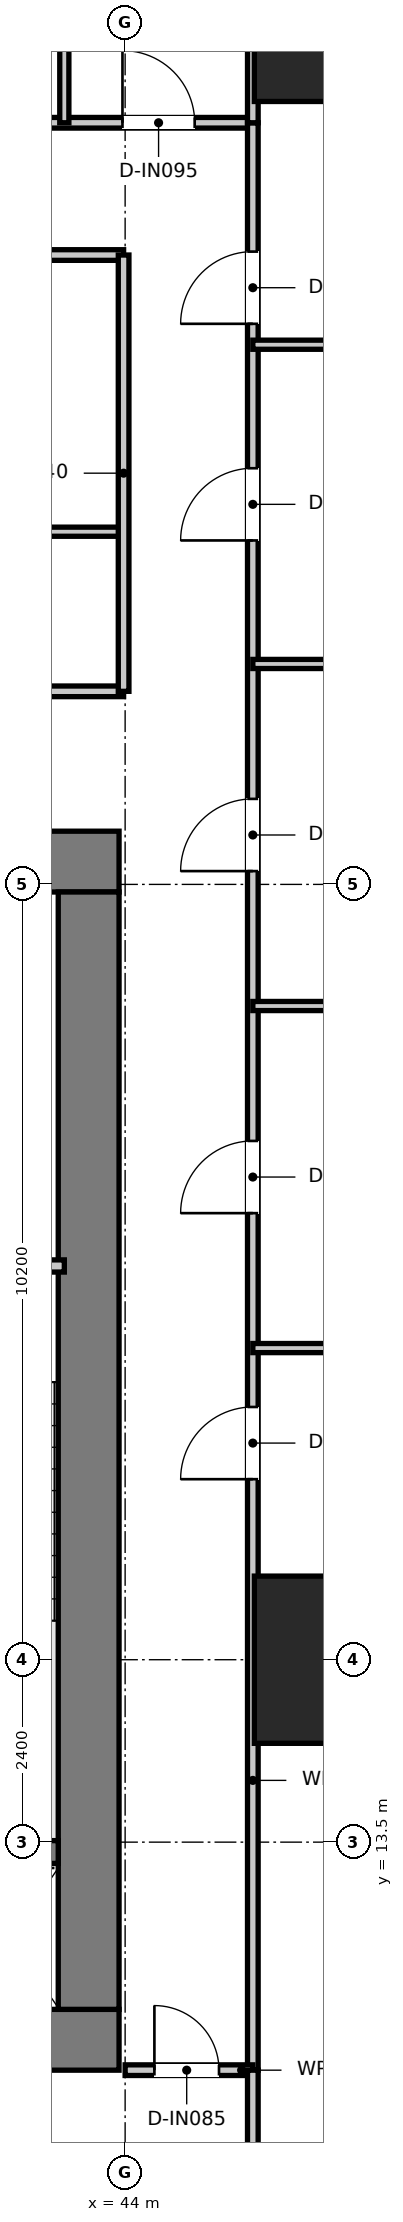
"""IFC4 building model, lengths in metres.
Left out: names, types, materials, properties, quantities, classifications, styles, units other than length and angle.
Written with IfcOpenShell. Run it as: python <this file> out.ifc"""

import sys

from ifc_helpers import new_model, si_unit, direction, frame, frame_2d, origin, origin_2d, place, context, subcontext, project, spatial, rectangle, extrude, source, transform, mapped, element, fill, save


model = new_model("IFC4")
c1 = context("Model", 3, precision=1e-05, world=origin(), true_north=direction((0.0, 1.0)))
c2 = subcontext(c1, "Body", "Model", "MODEL_VIEW")
j1 = project(units=[si_unit("LENGTHUNIT", "METRE"), si_unit("PLANEANGLEUNIT", "RADIAN")], contexts=[c1])
p1 = place(None, origin())
s1 = spatial("IfcSite", under=j1, at=p1, CompositionType="ELEMENT")
p2 = place(p1, origin())
s2 = spatial("IfcBuilding", under=s1, at=p2, CompositionType="ELEMENT")
p3 = place(p2, frame((0.0, 0.0, 68.45)))
s3 = spatial("IfcBuildingStorey", under=s2, at=p3, CompositionType="ELEMENT", Elevation=68.45)
p4 = place(p3, frame((28.08, 10.9, 0.0), z_axis=(0.0, 0.0, 1.0), x_axis=(1.0, 0.0, 0.0)))
e1 = element("IfcWall", 1, at=p4, inside=s3, PredefinedType="SHEAR", context=c2, shape_type="SweptSolid", body=[
    extrude(rectangle(XDim=15.84, YDim=0.8, at=frame_2d((7.92, 0.0))), origin(), (0.0, 0.0, 1.0), 3.95),
])
p5 = place(p3, frame((28.08, 26.4, 0.0), z_axis=(0.0, 0.0, 1.0), x_axis=(1.0, 0.0, 0.0)))
e2 = element("IfcWall", 2, at=p5, inside=s3, PredefinedType="SHEAR", context=c2, shape_type="SweptSolid", body=[
    extrude(rectangle(XDim=15.84, YDim=0.8, at=frame_2d((7.92, 0.0))), origin(), (0.0, 0.0, 1.0), 3.95),
])
p6 = place(p5, frame((7.22, 0.0, 0.0)))
e3 = element("IfcOpeningElement", 3, at=p6, cuts=e2, PredefinedType="OPENING", context=c2, shape_type="SweptSolid", body=[
    extrude(rectangle(XDim=1.4, YDim=2.2, at=frame_2d((0.7, 1.1))), frame((0.0, 0.41, 0.0), z_axis=(0.0, -1.0, 0.0), x_axis=(1.0, 0.0, 0.0)), (0.0, 0.0, 1.0), 0.82),
])
p7 = place(p5, frame((1.775, 0.0, 0.0)))
e4 = element("IfcOpeningElement", 4, at=p7, cuts=e2, PredefinedType="OPENING", context=c2, shape_type="SweptSolid", body=[
    extrude(rectangle(XDim=1.05, YDim=2.1, at=frame_2d((0.525, 1.05))), frame((0.0, 0.41, 0.0), z_axis=(0.0, -1.0, 0.0), x_axis=(1.0, 0.0, 0.0)), (0.0, 0.0, 1.0), 0.82),
])
p8 = place(p5, frame((13.015, 0.0, 0.0)))
e5 = element("IfcOpeningElement", 5, at=p8, cuts=e2, PredefinedType="OPENING", context=c2, shape_type="SweptSolid", body=[
    extrude(rectangle(XDim=1.05, YDim=2.1, at=frame_2d((0.525, 1.05))), frame((0.0, 0.41, 0.0), z_axis=(0.0, -1.0, 0.0), x_axis=(1.0, 0.0, 0.0)), (0.0, 0.0, 1.0), 0.82),
])
p9 = place(p3, frame((43.52, 11.3, 0.0), z_axis=(0.0, 0.0, 1.0), x_axis=(0.0, 1.0, 0.0)))
e6 = element("IfcWall", 6, at=p9, inside=s3, PredefinedType="SHEAR", context=c2, shape_type="SweptSolid", body=[
    extrude(rectangle(XDim=14.7, YDim=0.8, at=frame_2d((7.35, 0.0))), origin(), (0.0, 0.0, 1.0), 3.95),
])
p10 = place(p3, frame((40.02, 13.37, 0.0), z_axis=(0.0, 0.0, 1.0), x_axis=(1.0, 0.0, 0.0)))
e7 = element("IfcWall", 7, at=p10, inside=s3, PredefinedType="SHEAR", context=c2, shape_type="SweptSolid", body=[
    extrude(rectangle(XDim=3.1, YDim=0.3, at=frame_2d((1.55, 0.0))), origin(), (0.0, 0.0, 1.0), 3.95),
])
m1 = source(origin(), c2, "Body", "SweptSolid", [
    extrude(rectangle(XDim=2.2, YDim=2.2, at=origin_2d()), origin(), (0.0, 0.0, 1.0), 3.95),
])
for number, where, z_axis, x_axis in (
    (8, (46.8, 15.9, 0.0), (0.0, 0.0, 1.0), (1.0, 0.0, 0.0)),
    (9, (46.8, 37.5, 0.0), (0.0, 0.0, 1.0), (1.0, 0.0, 0.0)),
):
    element("IfcColumn", number, at=place(p3, frame(where, z_axis=z_axis, x_axis=x_axis)), inside=s3, PredefinedType="USERDEFINED", context=c2, shape_type="MappedRepresentation", body=[
        mapped(m1, transform((0.0, 0.0, 0.0), x_axis=(1.0, 0.0, 0.0), y_axis=(0.0, 1.0, 0.0), z_axis=(0.0, 0.0, 1.0), scale=1.0)),
    ])
p11 = place(p3, frame((40.04, 21.08, 0.0), z_axis=(0.0, 0.0, 1.0), x_axis=(1.0, 0.0, 0.0)))
e10 = element("IfcWall", 10, at=p11, inside=s3, PredefinedType="PARTITIONING", context=c2, shape_type="SweptSolid", body=[
    extrude(rectangle(XDim=3.16, YDim=0.16, at=frame_2d((1.58, 0.0))), origin(), (0.0, 0.0, 1.0), 3.67),
])
p12 = place(p11, frame((1.055, 0.0, 0.0)))
e11 = element("IfcOpeningElement", 11, at=p12, cuts=e10, PredefinedType="OPENING", context=c2, shape_type="SweptSolid", body=[
    extrude(rectangle(XDim=1.05, YDim=2.1, at=frame_2d((0.525, 1.05))), frame((0.0, 0.09, 0.0), z_axis=(0.0, -1.0, 0.0), x_axis=(1.0, 0.0, 0.0)), (0.0, 0.0, 1.0), 0.18),
])
p13 = place(p3, frame((28.02, 28.64, 0.0), z_axis=(0.0, 0.0, 1.0), x_axis=(1.0, 0.0, 0.0)))
e12 = element("IfcWall", 12, at=p13, inside=s3, PredefinedType="PARTITIONING", context=c2, shape_type="SweptSolid", body=[
    extrude(rectangle(XDim=15.96, YDim=0.14, at=frame_2d((7.98, 0.0))), origin(), (0.0, 0.0, 1.0), 3.08),
])
p14 = place(p13, frame((7.455, 0.0, 0.0)))
e13 = element("IfcOpeningElement", 13, at=p14, cuts=e12, PredefinedType="OPENING", context=c2, shape_type="SweptSolid", body=[
    extrude(rectangle(XDim=1.05, YDim=2.15, at=frame_2d((0.525, 1.075))), frame((0.0, 0.08, 0.0), z_axis=(0.0, -1.0, 0.0), x_axis=(1.0, 0.0, 0.0)), (0.0, 0.0, 1.0), 0.16),
])
p15 = place(p3, frame((28.02, 30.74, 0.0), z_axis=(0.0, 0.0, 1.0), x_axis=(1.0, 0.0, 0.0)))
e14 = element("IfcWall", 14, at=p15, inside=s3, PredefinedType="PARTITIONING", context=c2, shape_type="SweptSolid", body=[
    extrude(rectangle(XDim=15.96, YDim=0.12, at=frame_2d((7.98, 0.0))), origin(), (0.0, 0.0, 1.0), 3.08),
])
p16 = place(p3, frame((28.02, 34.38, 0.0), z_axis=(0.0, 0.0, 1.0), x_axis=(1.0, 0.0, 0.0)))
e15 = element("IfcWall", 15, at=p16, inside=s3, PredefinedType="PARTITIONING", context=c2, shape_type="SweptSolid", body=[
    extrude(rectangle(XDim=15.96, YDim=0.14, at=frame_2d((7.98, 0.0))), origin(), (0.0, 0.0, 1.0), 3.08),
])
p17 = place(p16, frame((1.13, 0.0, 0.0)))
e16 = element("IfcOpeningElement", 16, at=p17, cuts=e15, PredefinedType="OPENING", context=c2, shape_type="SweptSolid", body=[
    extrude(rectangle(XDim=0.9, YDim=2.1, at=frame_2d((0.45, 1.05))), frame((0.0, 0.08, 0.0), z_axis=(0.0, -1.0, 0.0), x_axis=(1.0, 0.0, 0.0)), (0.0, 0.0, 1.0), 0.16),
])
p18 = place(p16, frame((4.33, 0.0, 0.0)))
e17 = element("IfcOpeningElement", 17, at=p18, cuts=e15, PredefinedType="OPENING", context=c2, shape_type="SweptSolid", body=[
    extrude(rectangle(XDim=0.9, YDim=2.1, at=frame_2d((0.45, 1.05))), frame((0.0, 0.08, 0.0), z_axis=(0.0, -1.0, 0.0), x_axis=(1.0, 0.0, 0.0)), (0.0, 0.0, 1.0), 0.16),
])
p19 = place(p16, frame((7.355, 0.0, 0.0)))
e18 = element("IfcOpeningElement", 18, at=p19, cuts=e15, PredefinedType="OPENING", context=c2, shape_type="SweptSolid", body=[
    extrude(rectangle(XDim=0.95, YDim=2.1, at=frame_2d((0.475, 1.05))), frame((0.0, 0.08, 0.0), z_axis=(0.0, -1.0, 0.0), x_axis=(1.0, 0.0, 0.0)), (0.0, 0.0, 1.0), 0.16),
])
p20 = place(p16, frame((12.23, 0.0, 0.0)))
e19 = element("IfcOpeningElement", 19, at=p20, cuts=e15, PredefinedType="OPENING", context=c2, shape_type="SweptSolid", body=[
    extrude(rectangle(XDim=0.95, YDim=2.1, at=frame_2d((0.475, 1.05))), frame((0.0, 0.08, 0.0), z_axis=(0.0, -1.0, 0.0), x_axis=(1.0, 0.0, 0.0)), (0.0, 0.0, 1.0), 0.16),
])
p21 = place(p3, frame((43.98, 28.64, 0.0), z_axis=(0.0, 0.0, 1.0), x_axis=(0.0, 1.0, 0.0)))
e20 = element("IfcWall", 20, at=p21, inside=s3, PredefinedType="PARTITIONING", context=c2, shape_type="SweptSolid", body=[
    extrude(rectangle(XDim=5.74, YDim=0.14, at=frame_2d((2.87, 0.0))), origin(), (0.0, 0.0, 1.0), 3.22),
])
p22 = place(p3, frame((26.32, 36.12, 0.0), z_axis=(0.0, 0.0, 1.0), x_axis=(1.0, 0.0, 0.0)))
e21 = element("IfcWall", 21, at=p22, inside=s3, PredefinedType="PARTITIONING", context=c2, shape_type="SweptSolid", body=[
    extrude(rectangle(XDim=19.36, YDim=0.14, at=frame_2d((9.68, 0.0))), origin(), (0.0, 0.0, 1.0), 3.08),
])
p23 = place(p22, frame((1.265, 0.0, 0.0)))
e22 = element("IfcOpeningElement", 22, at=p23, cuts=e21, PredefinedType="OPENING", context=c2, shape_type="SweptSolid", body=[
    extrude(rectangle(XDim=0.95, YDim=2.1, at=frame_2d((0.475, 1.05))), frame((0.0, 0.08, 0.0), z_axis=(0.0, -1.0, 0.0), x_axis=(1.0, 0.0, 0.0)), (0.0, 0.0, 1.0), 0.16),
])
p24 = place(p22, frame((5.305, 0.0, 0.0)))
e23 = element("IfcOpeningElement", 23, at=p24, cuts=e21, PredefinedType="OPENING", context=c2, shape_type="SweptSolid", body=[
    extrude(rectangle(XDim=0.95, YDim=2.1, at=frame_2d((0.475, 1.05))), frame((0.0, 0.08, 0.0), z_axis=(0.0, -1.0, 0.0), x_axis=(1.0, 0.0, 0.0)), (0.0, 0.0, 1.0), 0.16),
])
p25 = place(p22, frame((9.905, 0.0, 0.0)))
e24 = element("IfcOpeningElement", 24, at=p25, cuts=e21, PredefinedType="OPENING", context=c2, shape_type="SweptSolid", body=[
    extrude(rectangle(XDim=0.95, YDim=2.1, at=frame_2d((0.475, 1.05))), frame((0.0, 0.08, 0.0), z_axis=(0.0, -1.0, 0.0), x_axis=(1.0, 0.0, 0.0)), (0.0, 0.0, 1.0), 0.16),
])
p26 = place(p22, frame((14.305, 0.0, 0.0)))
e25 = element("IfcOpeningElement", 25, at=p26, cuts=e21, PredefinedType="OPENING", context=c2, shape_type="SweptSolid", body=[
    extrude(rectangle(XDim=0.95, YDim=2.1, at=frame_2d((0.475, 1.05))), frame((0.0, 0.08, 0.0), z_axis=(0.0, -1.0, 0.0), x_axis=(1.0, 0.0, 0.0)), (0.0, 0.0, 1.0), 0.16),
])
p27 = place(p22, frame((17.645, 0.0, 0.0)))
e26 = element("IfcOpeningElement", 26, at=p27, cuts=e21, PredefinedType="OPENING", context=c2, shape_type="SweptSolid", body=[
    extrude(rectangle(XDim=0.95, YDim=2.1, at=frame_2d((0.475, 1.05))), frame((0.0, 0.08, 0.0), z_axis=(0.0, -1.0, 0.0), x_axis=(1.0, 0.0, 0.0)), (0.0, 0.0, 1.0), 0.16),
])
p28 = place(p3, frame((45.68, 10.5, 0.0), z_axis=(0.0, 0.0, 1.0), x_axis=(0.0, 1.0, 0.0)))
e27 = element("IfcWall", 27, at=p28, inside=s3, PredefinedType="PARTITIONING", context=c2, shape_type="SweptSolid", body=[
    extrude(rectangle(XDim=25.62, YDim=0.14, at=frame_2d((12.81, 0.0))), origin(), (0.0, 0.0, 1.0), 2.97),
])
p29 = place(p28, frame((7.775, 0.0, 0.0)))
e28 = element("IfcOpeningElement", 28, at=p29, cuts=e27, PredefinedType="OPENING", context=c2, shape_type="SweptSolid", body=[
    extrude(rectangle(XDim=0.95, YDim=2.1, at=frame_2d((0.475, 1.05))), frame((0.0, 0.08, 0.0), z_axis=(0.0, -1.0, 0.0), x_axis=(1.0, 0.0, 0.0)), (0.0, 0.0, 1.0), 0.16),
])
p30 = place(p28, frame((11.275, 0.0, 0.0)))
e29 = element("IfcOpeningElement", 29, at=p30, cuts=e27, PredefinedType="OPENING", context=c2, shape_type="SweptSolid", body=[
    extrude(rectangle(XDim=0.95, YDim=2.1, at=frame_2d((0.475, 1.05))), frame((0.0, 0.08, 0.0), z_axis=(0.0, -1.0, 0.0), x_axis=(1.0, 0.0, 0.0)), (0.0, 0.0, 1.0), 0.16),
])
p31 = place(p28, frame((15.775, 0.0, 0.0)))
e30 = element("IfcOpeningElement", 30, at=p31, cuts=e27, PredefinedType="OPENING", context=c2, shape_type="SweptSolid", body=[
    extrude(rectangle(XDim=0.95, YDim=2.1, at=frame_2d((0.475, 1.05))), frame((0.0, 0.08, 0.0), z_axis=(0.0, -1.0, 0.0), x_axis=(1.0, 0.0, 0.0)), (0.0, 0.0, 1.0), 0.16),
])
p32 = place(p28, frame((20.125, 0.0, 0.0)))
e31 = element("IfcOpeningElement", 31, at=p32, cuts=e27, PredefinedType="OPENING", context=c2, shape_type="SweptSolid", body=[
    extrude(rectangle(XDim=0.95, YDim=2.1, at=frame_2d((0.475, 1.05))), frame((0.0, 0.08, 0.0), z_axis=(0.0, -1.0, 0.0), x_axis=(1.0, 0.0, 0.0)), (0.0, 0.0, 1.0), 0.16),
])
p33 = place(p28, frame((22.975, 0.0, 0.0)))
e32 = element("IfcOpeningElement", 32, at=p33, cuts=e27, PredefinedType="OPENING", context=c2, shape_type="SweptSolid", body=[
    extrude(rectangle(XDim=0.95, YDim=2.1, at=frame_2d((0.475, 1.05))), frame((0.0, 0.08, 0.0), z_axis=(0.0, -1.0, 0.0), x_axis=(1.0, 0.0, 0.0)), (0.0, 0.0, 1.0), 0.16),
])
p34 = place(p3, frame((44.0, 10.5, 0.0), z_axis=(0.0, 0.0, 1.0), x_axis=(1.0, 0.0, 0.0)))
e33 = element("IfcWall", 33, at=p34, inside=s3, PredefinedType="PARTITIONING", context=c2, shape_type="SweptSolid", body=[
    extrude(rectangle(XDim=1.68, YDim=0.14, at=frame_2d((0.84, 0.0))), origin(), (0.0, 0.0, 1.0), 3.67),
])
p35 = place(p34, frame((0.385, 0.0, 0.0)))
e34 = element("IfcOpeningElement", 34, at=p35, cuts=e33, PredefinedType="OPENING", context=c2, shape_type="SweptSolid", body=[
    extrude(rectangle(XDim=0.85, YDim=2.1, at=frame_2d((0.425, 1.05))), frame((0.0, 0.08, 0.0), z_axis=(0.0, -1.0, 0.0), x_axis=(1.0, 0.0, 0.0)), (0.0, 0.0, 1.0), 0.16),
])
p36 = place(p3, frame((45.68, 36.12, 0.0), z_axis=(0.0, 0.0, 1.0), x_axis=(0.0, 1.0, 0.0)))
e35 = element("IfcWall", 35, at=p36, inside=s3, PredefinedType="PARTITIONING", context=c2, shape_type="SweptSolid", body=[
    extrude(rectangle(XDim=14.32, YDim=0.14, at=frame_2d((7.16, 0.0))), origin(), (0.0, 0.0, 1.0), 2.97),
])
p37 = place(p3, frame((45.68, 0.067, 0.0), z_axis=(0.0, 0.0, 1.0), x_axis=(0.0, 1.0, 0.0)))
e36 = element("IfcWall", 36, at=p37, inside=s3, PredefinedType="PARTITIONING", context=c2, shape_type="SweptSolid", body=[
    extrude(rectangle(XDim=10.433, YDim=0.14, at=frame_2d((5.217, 0.0))), origin(), (0.0, 0.0, 1.0), 3.67),
])
p38 = place(p3, frame((43.2, 36.12, 0.0), z_axis=(0.0, 0.0, 1.0), x_axis=(0.0, 1.0, 0.0)))
e37 = element("IfcWall", 37, at=p38, inside=s3, PredefinedType="PARTITIONING", context=c2, shape_type="SweptSolid", body=[
    extrude(rectangle(XDim=14.69, YDim=0.12, at=frame_2d((7.345, 0.0))), origin(), (0.0, 0.0, 1.0), 2.97),
])
p39 = place(p3, frame((45.68, 20.0, 0.0), z_axis=(0.0, 0.0, 1.0), x_axis=(1.0, 0.0, 0.0)))
e38 = element("IfcWall", 38, at=p39, inside=s3, PredefinedType="PARTITIONING", context=c2, shape_type="SweptSolid", body=[
    extrude(rectangle(XDim=14.505, YDim=0.12, at=frame_2d((7.253, 0.0))), origin(), (0.0, 0.0, 1.0), 2.97),
])
p40 = place(p3, frame((45.68, 24.5, 0.0), z_axis=(0.0, 0.0, 1.0), x_axis=(1.0, 0.0, 0.0)))
e39 = element("IfcWall", 39, at=p40, inside=s3, PredefinedType="PARTITIONING", context=c2, shape_type="SweptSolid", body=[
    extrude(rectangle(XDim=15.178, YDim=0.12, at=frame_2d((7.589, 0.0))), origin(), (0.0, 0.0, 1.0), 2.97),
])
p41 = place(p3, frame((45.68, 29.0, 0.0), z_axis=(0.0, 0.0, 1.0), x_axis=(1.0, 0.0, 0.0)))
e40 = element("IfcWall", 40, at=p41, inside=s3, PredefinedType="PARTITIONING", context=c2, shape_type="SweptSolid", body=[
    extrude(rectangle(XDim=15.851, YDim=0.12, at=frame_2d((7.925, 0.0))), origin(), (0.0, 0.0, 1.0), 2.97),
])
p42 = place(p3, frame((45.68, 33.2, 0.0), z_axis=(0.0, 0.0, 1.0), x_axis=(1.0, 0.0, 0.0)))
e41 = element("IfcWall", 41, at=p42, inside=s3, PredefinedType="PARTITIONING", context=c2, shape_type="SweptSolid", body=[
    extrude(rectangle(XDim=16.478, YDim=0.12, at=frame_2d((8.239, 0.0))), origin(), (0.0, 0.0, 1.0), 2.97),
])
p43 = place(p27, origin())
e42 = element("IfcDoor", 42, at=p43, inside=s3, OperationType="SINGLE_SWING_LEFT", PredefinedType="DOOR", context=c2, shape_type="SweptSolid", body=[
    extrude(rectangle(XDim=0.95, YDim=2.1, at=frame_2d((0.475, 1.05))), frame((0.0, 0.025, 0.0), z_axis=(0.0, -1.0, 0.0), x_axis=(1.0, 0.0, 0.0)), (0.0, 0.0, 1.0), 0.05),
])
fill(e26, e42)
p44 = place(p29, origin())
e43 = element("IfcDoor", 43, at=p44, inside=s3, OperationType="SINGLE_SWING_LEFT", PredefinedType="DOOR", context=c2, shape_type="SweptSolid", body=[
    extrude(rectangle(XDim=0.95, YDim=2.1, at=frame_2d((0.475, 1.05))), frame((0.0, 0.025, 0.0), z_axis=(0.0, -1.0, 0.0), x_axis=(1.0, 0.0, 0.0)), (0.0, 0.0, 1.0), 0.05),
])
fill(e28, e43)
p45 = place(p30, origin())
e44 = element("IfcDoor", 44, at=p45, inside=s3, OperationType="SINGLE_SWING_LEFT", PredefinedType="DOOR", context=c2, shape_type="SweptSolid", body=[
    extrude(rectangle(XDim=0.95, YDim=2.1, at=frame_2d((0.475, 1.05))), frame((0.0, 0.025, 0.0), z_axis=(0.0, -1.0, 0.0), x_axis=(1.0, 0.0, 0.0)), (0.0, 0.0, 1.0), 0.05),
])
fill(e29, e44)
p46 = place(p31, origin())
e45 = element("IfcDoor", 45, at=p46, inside=s3, OperationType="SINGLE_SWING_LEFT", PredefinedType="DOOR", context=c2, shape_type="SweptSolid", body=[
    extrude(rectangle(XDim=0.95, YDim=2.1, at=frame_2d((0.475, 1.05))), frame((0.0, 0.025, 0.0), z_axis=(0.0, -1.0, 0.0), x_axis=(1.0, 0.0, 0.0)), (0.0, 0.0, 1.0), 0.05),
])
fill(e30, e45)
p47 = place(p32, origin())
e46 = element("IfcDoor", 46, at=p47, inside=s3, OperationType="SINGLE_SWING_LEFT", PredefinedType="DOOR", context=c2, shape_type="SweptSolid", body=[
    extrude(rectangle(XDim=0.95, YDim=2.1, at=frame_2d((0.475, 1.05))), frame((0.0, 0.025, 0.0), z_axis=(0.0, -1.0, 0.0), x_axis=(1.0, 0.0, 0.0)), (0.0, 0.0, 1.0), 0.05),
])
fill(e31, e46)
p48 = place(p33, origin())
e47 = element("IfcDoor", 47, at=p48, inside=s3, OperationType="SINGLE_SWING_LEFT", PredefinedType="DOOR", context=c2, shape_type="SweptSolid", body=[
    extrude(rectangle(XDim=0.95, YDim=2.1, at=frame_2d((0.475, 1.05))), frame((0.0, 0.025, 0.0), z_axis=(0.0, -1.0, 0.0), x_axis=(1.0, 0.0, 0.0)), (0.0, 0.0, 1.0), 0.05),
])
fill(e32, e47)
p49 = place(p35, origin())
e48 = element("IfcDoor", 48, at=p49, inside=s3, OperationType="SINGLE_SWING_LEFT", PredefinedType="DOOR", context=c2, shape_type="SweptSolid", body=[
    extrude(rectangle(XDim=0.85, YDim=2.1, at=frame_2d((0.425, 1.05))), frame((0.0, 0.025, 0.0), z_axis=(0.0, -1.0, 0.0), x_axis=(1.0, 0.0, 0.0)), (0.0, 0.0, 1.0), 0.05),
])
fill(e34, e48)
save(model, sys.argv[1])
